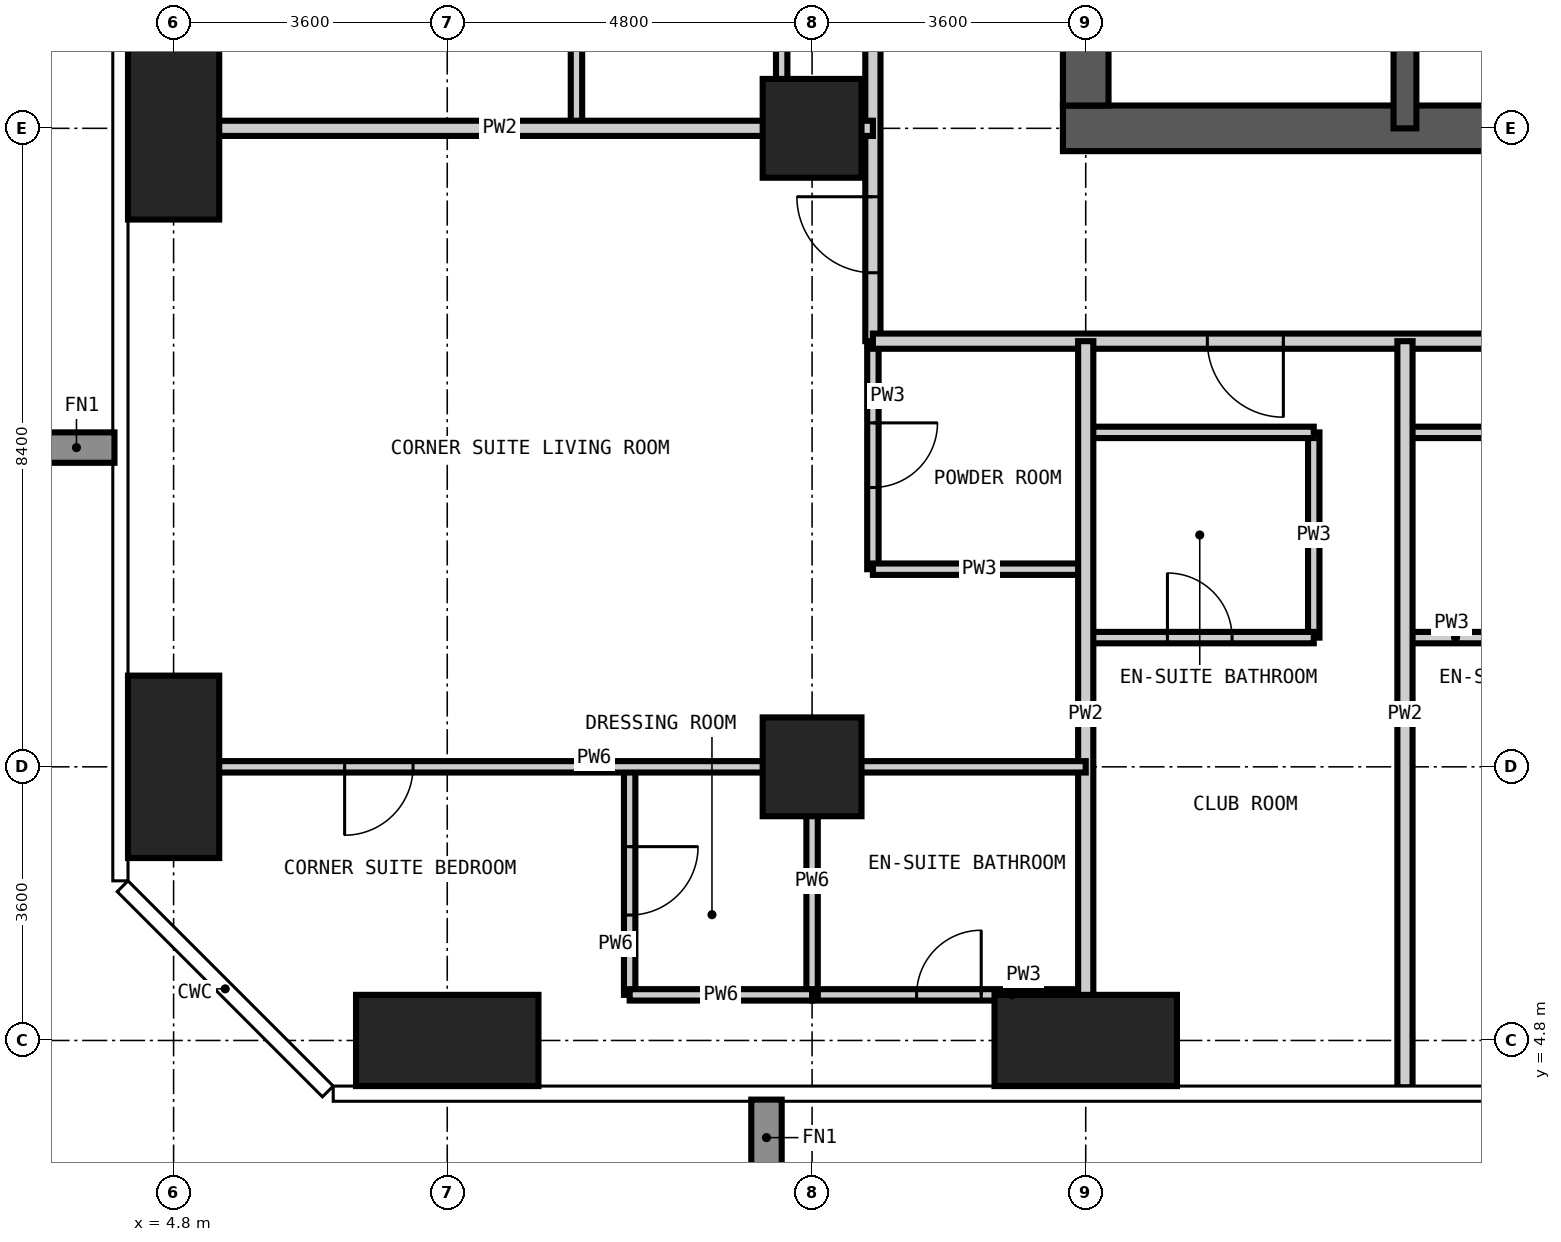
"""IFC4 building model, lengths in metres.
Left out: names, types, materials, properties, quantities, classifications, styles, units other than length and angle.
Written with IfcOpenShell. Run it as: python <this file> out.ifc"""

import sys

from ifc_helpers import new_model, si_unit, direction, frame, frame_2d, origin, origin_2d, place, context, subcontext, project, spatial, rectangle, extrude, element, fill, save


model = new_model("IFC4")
c1 = context("Model", 3, precision=1e-05, world=origin(), true_north=direction((0.0, 1.0)))
c2 = subcontext(c1, "Body", "Model", "MODEL_VIEW")
j1 = project(units=[si_unit("LENGTHUNIT", "METRE"), si_unit("PLANEANGLEUNIT", "RADIAN")], contexts=[c1])
p1 = place(None, origin())
s1 = spatial("IfcSite", under=j1, at=p1, CompositionType="ELEMENT")
p2 = place(p1, origin())
s2 = spatial("IfcBuilding", under=s1, at=p2, CompositionType="ELEMENT")
p3 = place(p2, frame((0.0, 0.0, 187.8)))
s3 = spatial("IfcBuildingStorey", under=s2, at=p3, CompositionType="ELEMENT", Elevation=187.8)
for number, where, z_axis, x_axis in (
    (1, (4.8, 8.4, -0.35), (0.0, 0.0, 1.0), (1.0, 0.0, 0.0)),
    (2, (4.8, 16.8, -0.35), (0.0, 0.0, 1.0), (1.0, 0.0, 0.0)),
):
    element("IfcColumn", number, at=place(p3, frame(where, z_axis=z_axis, x_axis=x_axis)), inside=s3, PredefinedType="COLUMN", context=c2, shape_type="SweptSolid", body=[
        extrude(rectangle(XDim=1.2, YDim=2.4, at=origin_2d()), origin(), (0.0, 0.0, 1.0), 3.6),
    ])
p4 = place(p3, frame((8.4, 4.8, -0.35), z_axis=(0.0, 0.0, 1.0), x_axis=(1.0, 0.0, 0.0)))
e3 = element("IfcColumn", 3, at=p4, inside=s3, PredefinedType="COLUMN", context=c2, shape_type="SweptSolid", body=[
    extrude(rectangle(XDim=2.4, YDim=1.2, at=origin_2d()), origin(), (0.0, 0.0, 1.0), 3.6),
])
for number, where, z_axis, x_axis in (
    (4, (13.2, 8.4, -0.35), (0.0, 0.0, 1.0), (1.0, 0.0, 0.0)),
    (5, (13.2, 16.8, -0.35), (0.0, 0.0, 1.0), (1.0, 0.0, 0.0)),
):
    element("IfcColumn", number, at=place(p3, frame(where, z_axis=z_axis, x_axis=x_axis)), inside=s3, PredefinedType="COLUMN", context=c2, shape_type="SweptSolid", body=[
        extrude(rectangle(XDim=1.3, YDim=1.3, at=origin_2d()), origin(), (0.0, 0.0, 1.0), 3.6),
    ])
p5 = place(p3, frame((16.8, 4.8, -0.35), z_axis=(0.0, 0.0, 1.0), x_axis=(1.0, 0.0, 0.0)))
e6 = element("IfcColumn", 6, at=p5, inside=s3, PredefinedType="COLUMN", context=c2, shape_type="SweptSolid", body=[
    extrude(rectangle(XDim=2.4, YDim=1.2, at=origin_2d()), origin(), (0.0, 0.0, 1.0), 3.6),
])
p6 = place(p3, frame((16.5, 16.8, -0.35), z_axis=(0.0, 0.0, 1.0), x_axis=(1.0, 0.0, 0.0)))
e7 = element("IfcWall", 7, at=p6, inside=s3, PredefinedType="SHEAR", context=c2, shape_type="SweptSolid", body=[
    extrude(rectangle(XDim=25.8, YDim=0.6, at=frame_2d((12.9, 0.0))), origin(), (0.0, 0.0, 1.0), 3.6),
])
p7 = place(p6, frame((12.4, 0.0, 0.35)))
e8 = element("IfcOpeningElement", 8, at=p7, cuts=e7, PredefinedType="OPENING", context=c2, shape_type="SweptSolid", body=[
    extrude(rectangle(XDim=1.0, YDim=2.1, at=frame_2d((0.5, 1.05))), frame((0.0, 0.31, 0.0), z_axis=(0.0, -1.0, 0.0), x_axis=(1.0, 0.0, 0.0)), (0.0, 0.0, 1.0), 0.62),
])
p8 = place(p6, frame((18.7, 0.0, 0.35)))
e9 = element("IfcOpeningElement", 9, at=p8, cuts=e7, PredefinedType="OPENING", context=c2, shape_type="SweptSolid", body=[
    extrude(rectangle(XDim=1.0, YDim=2.1, at=frame_2d((0.5, 1.05))), frame((0.0, 0.31, 0.0), z_axis=(0.0, -1.0, 0.0), x_axis=(1.0, 0.0, 0.0)), (0.0, 0.0, 1.0), 0.62),
])
p9 = place(p3, frame((16.8, 41.7, -0.35), z_axis=(0.0, 0.0, 1.0), x_axis=(0.0, -1.0, 0.0)))
e10 = element("IfcWall", 10, at=p9, inside=s3, PredefinedType="SHEAR", context=c2, shape_type="SweptSolid", body=[
    extrude(rectangle(XDim=24.6, YDim=0.6, at=frame_2d((12.3, 0.0))), origin(), (0.0, 0.0, 1.0), 3.6),
])
p10 = place(p9, frame((11.4, 0.0, 0.35)))
e11 = element("IfcOpeningElement", 11, at=p10, cuts=e10, PredefinedType="OPENING", context=c2, shape_type="SweptSolid", body=[
    extrude(rectangle(XDim=1.8, YDim=2.2, at=frame_2d((0.9, 1.1))), frame((0.0, 0.31, 0.0), z_axis=(0.0, -1.0, 0.0), x_axis=(1.0, 0.0, 0.0)), (0.0, 0.0, 1.0), 0.62),
])
p11 = place(p9, frame((20.2, 0.0, 0.35)))
e12 = element("IfcOpeningElement", 12, at=p11, cuts=e10, PredefinedType="OPENING", context=c2, shape_type="SweptSolid", body=[
    extrude(rectangle(XDim=1.0, YDim=2.1, at=frame_2d((0.5, 1.05))), frame((0.0, 0.31, 0.0), z_axis=(0.0, -1.0, 0.0), x_axis=(1.0, 0.0, 0.0)), (0.0, 0.0, 1.0), 0.62),
])
p12 = place(p9, frame((5.5, 0.0, 0.35)))
e13 = element("IfcOpeningElement", 13, at=p12, cuts=e10, PredefinedType="OPENING", context=c2, shape_type="SweptSolid", body=[
    extrude(rectangle(XDim=1.0, YDim=2.1, at=frame_2d((0.5, 1.05))), frame((0.0, 0.31, 0.0), z_axis=(0.0, -1.0, 0.0), x_axis=(1.0, 0.0, 0.0)), (0.0, 0.0, 1.0), 0.62),
])
p13 = place(p3, frame((21.0, 16.8, -0.35), z_axis=(0.0, 0.0, 1.0), x_axis=(0.0, 1.0, 0.0)))
e14 = element("IfcWall", 14, at=p13, inside=s3, PredefinedType="SHEAR", context=c2, shape_type="SweptSolid", body=[
    extrude(rectangle(XDim=2.8, YDim=0.3, at=frame_2d((1.4, 0.0))), origin(), (0.0, 0.0, 1.0), 3.6),
])
p14 = place(p3, frame((10.1, 16.8, 0.0), z_axis=(0.0, 0.0, 1.0), x_axis=(0.0, 1.0, 0.0)))
e15 = element("IfcWall", 15, at=p14, inside=s3, PredefinedType="PARTITIONING", context=c2, shape_type="SweptSolid", body=[
    extrude(rectangle(XDim=3.0, YDim=0.15, at=frame_2d((1.5, 0.0))), origin(), (0.0, 0.0, 1.0), 3.25),
])
p15 = place(p3, frame((12.8, 16.8, 0.0), z_axis=(0.0, 0.0, 1.0), x_axis=(0.0, 1.0, 0.0)))
e16 = element("IfcWall", 16, at=p15, inside=s3, PredefinedType="PARTITIONING", context=c2, shape_type="SweptSolid", body=[
    extrude(rectangle(XDim=3.0, YDim=0.15, at=frame_2d((1.5, 0.0))), origin(), (0.0, 0.0, 1.0), 3.25),
])
p16 = place(p15, frame((1.075, 0.0, 0.0)))
e17 = element("IfcOpeningElement", 17, at=p16, cuts=e16, PredefinedType="OPENING", context=c2, shape_type="SweptSolid", body=[
    extrude(rectangle(XDim=0.85, YDim=2.1, at=frame_2d((0.425, 1.05))), frame((0.0, 0.085, 0.0), z_axis=(0.0, -1.0, 0.0), x_axis=(1.0, 0.0, 0.0)), (0.0, 0.0, 1.0), 0.17),
])
p17 = place(p3, frame((14.0, 11.0, 0.0), z_axis=(0.0, 0.0, 1.0), x_axis=(0.0, 1.0, 0.0)))
e18 = element("IfcWall", 18, at=p17, inside=s3, PredefinedType="PARTITIONING", context=c2, shape_type="SweptSolid", body=[
    extrude(rectangle(XDim=3.0, YDim=0.15, at=frame_2d((1.5, 0.0))), origin(), (0.0, 0.0, 1.0), 3.25),
])
p18 = place(p17, frame((1.075, 0.0, 0.0)))
e19 = element("IfcOpeningElement", 19, at=p18, cuts=e18, PredefinedType="OPENING", context=c2, shape_type="SweptSolid", body=[
    extrude(rectangle(XDim=0.85, YDim=2.1, at=frame_2d((0.425, 1.05))), frame((0.0, 0.085, 0.0), z_axis=(0.0, -1.0, 0.0), x_axis=(1.0, 0.0, 0.0)), (0.0, 0.0, 1.0), 0.17),
])
p19 = place(p3, frame((19.8, 10.1, 0.0), z_axis=(0.0, 0.0, 1.0), x_axis=(0.0, 1.0, 0.0)))
e20 = element("IfcWall", 20, at=p19, inside=s3, PredefinedType="PARTITIONING", context=c2, shape_type="SweptSolid", body=[
    extrude(rectangle(XDim=2.7, YDim=0.15, at=frame_2d((1.35, 0.0))), origin(), (0.0, 0.0, 1.0), 3.25),
])
p20 = place(p3, frame((13.2, 5.4, 0.0), z_axis=(0.0, 0.0, 1.0), x_axis=(1.0, 0.0, 0.0)))
e21 = element("IfcWall", 21, at=p20, inside=s3, PredefinedType="PARTITIONING", context=c2, shape_type="SweptSolid", body=[
    extrude(rectangle(XDim=3.6, YDim=0.15, at=frame_2d((1.8, 0.0))), origin(), (0.0, 0.0, 1.0), 3.25),
])
p21 = place(p20, frame((1.375, 0.0, 0.0)))
e22 = element("IfcOpeningElement", 22, at=p21, cuts=e21, PredefinedType="OPENING", context=c2, shape_type="SweptSolid", body=[
    extrude(rectangle(XDim=0.85, YDim=2.1, at=frame_2d((0.425, 1.05))), frame((0.0, 0.085, 0.0), z_axis=(0.0, -1.0, 0.0), x_axis=(1.0, 0.0, 0.0)), (0.0, 0.0, 1.0), 0.17),
])
p22 = place(p3, frame((16.8, 10.1, 0.0), z_axis=(0.0, 0.0, 1.0), x_axis=(1.0, 0.0, 0.0)))
e23 = element("IfcWall", 23, at=p22, inside=s3, PredefinedType="PARTITIONING", context=c2, shape_type="SweptSolid", body=[
    extrude(rectangle(XDim=3.0, YDim=0.15, at=frame_2d((1.5, 0.0))), origin(), (0.0, 0.0, 1.0), 3.25),
])
p23 = place(p22, frame((1.075, 0.0, 0.0)))
e24 = element("IfcOpeningElement", 24, at=p23, cuts=e23, PredefinedType="OPENING", context=c2, shape_type="SweptSolid", body=[
    extrude(rectangle(XDim=0.85, YDim=2.1, at=frame_2d((0.425, 1.05))), frame((0.0, 0.085, 0.0), z_axis=(0.0, -1.0, 0.0), x_axis=(1.0, 0.0, 0.0)), (0.0, 0.0, 1.0), 0.17),
])
p24 = place(p3, frame((21.0, 10.1, 0.0), z_axis=(0.0, 0.0, 1.0), x_axis=(1.0, 0.0, 0.0)))
e25 = element("IfcWall", 25, at=p24, inside=s3, PredefinedType="PARTITIONING", context=c2, shape_type="SweptSolid", body=[
    extrude(rectangle(XDim=3.0, YDim=0.15, at=frame_2d((1.5, 0.0))), origin(), (0.0, 0.0, 1.0), 3.25),
])
p25 = place(p24, frame((1.075, 0.0, 0.0)))
e26 = element("IfcOpeningElement", 26, at=p25, cuts=e25, PredefinedType="OPENING", context=c2, shape_type="SweptSolid", body=[
    extrude(rectangle(XDim=0.85, YDim=2.1, at=frame_2d((0.425, 1.05))), frame((0.0, 0.085, 0.0), z_axis=(0.0, -1.0, 0.0), x_axis=(1.0, 0.0, 0.0)), (0.0, 0.0, 1.0), 0.17),
])
p26 = place(p3, frame((14.0, 11.0, 0.0), z_axis=(0.0, 0.0, 1.0), x_axis=(1.0, 0.0, 0.0)))
e27 = element("IfcWall", 27, at=p26, inside=s3, PredefinedType="PARTITIONING", context=c2, shape_type="SweptSolid", body=[
    extrude(rectangle(XDim=2.8, YDim=0.15, at=frame_2d((1.4, 0.0))), origin(), (0.0, 0.0, 1.0), 3.25),
])
for number, where, z_axis, x_axis in (
    (28, (16.8, 12.8, 0.0), (0.0, 0.0, 1.0), (1.0, 0.0, 0.0)),
    (29, (21.0, 12.8, 0.0), (0.0, 0.0, 1.0), (1.0, 0.0, 0.0)),
):
    element("IfcWall", number, at=place(p3, frame(where, z_axis=z_axis, x_axis=x_axis)), inside=s3, PredefinedType="PARTITIONING", context=c2, shape_type="SweptSolid", body=[
        extrude(rectangle(XDim=3.0, YDim=0.15, at=frame_2d((1.5, 0.0))), origin(), (0.0, 0.0, 1.0), 3.25),
    ])
p27 = place(p3, frame((14.0, 14.0, 0.0), z_axis=(0.0, 0.0, 1.0), x_axis=(0.0, 1.0, 0.0)))
e30 = element("IfcWall", 30, at=p27, inside=s3, PredefinedType="PARTITIONING", context=c2, shape_type="SweptSolid", body=[
    extrude(rectangle(XDim=30.2, YDim=0.2, at=frame_2d((15.1, 0.0))), origin(), (0.0, 0.0, 1.0), 3.25),
])
p28 = place(p27, frame((6.5, 0.0, 0.0)))
e31 = element("IfcOpeningElement", 31, at=p28, cuts=e30, PredefinedType="OPENING", context=c2, shape_type="SweptSolid", body=[
    extrude(rectangle(XDim=1.0, YDim=2.2, at=frame_2d((0.5, 1.1))), frame((0.0, 0.11, 0.0), z_axis=(0.0, -1.0, 0.0), x_axis=(1.0, 0.0, 0.0)), (0.0, 0.0, 1.0), 0.22),
])
p29 = place(p27, frame((14.9, 0.0, 0.0)))
e32 = element("IfcOpeningElement", 32, at=p29, cuts=e30, PredefinedType="OPENING", context=c2, shape_type="SweptSolid", body=[
    extrude(rectangle(XDim=1.0, YDim=2.2, at=frame_2d((0.5, 1.1))), frame((0.0, 0.11, 0.0), z_axis=(0.0, -1.0, 0.0), x_axis=(1.0, 0.0, 0.0)), (0.0, 0.0, 1.0), 0.22),
])
p30 = place(p27, frame((23.3, 0.0, 0.0)))
e33 = element("IfcOpeningElement", 33, at=p30, cuts=e30, PredefinedType="OPENING", context=c2, shape_type="SweptSolid", body=[
    extrude(rectangle(XDim=1.0, YDim=2.2, at=frame_2d((0.5, 1.1))), frame((0.0, 0.11, 0.0), z_axis=(0.0, -1.0, 0.0), x_axis=(1.0, 0.0, 0.0)), (0.0, 0.0, 1.0), 0.22),
])
p31 = place(p27, frame((0.9, 0.0, 0.0)))
e34 = element("IfcOpeningElement", 34, at=p31, cuts=e30, PredefinedType="OPENING", context=c2, shape_type="SweptSolid", body=[
    extrude(rectangle(XDim=1.0, YDim=2.2, at=frame_2d((0.5, 1.1))), frame((0.0, 0.11, 0.0), z_axis=(0.0, -1.0, 0.0), x_axis=(1.0, 0.0, 0.0)), (0.0, 0.0, 1.0), 0.22),
])
p32 = place(p27, frame((28.7, 0.0, 0.0)))
e35 = element("IfcOpeningElement", 35, at=p32, cuts=e30, PredefinedType="OPENING", context=c2, shape_type="SweptSolid", body=[
    extrude(rectangle(XDim=1.0, YDim=2.2, at=frame_2d((0.5, 1.1))), frame((0.0, 0.11, 0.0), z_axis=(0.0, -1.0, 0.0), x_axis=(1.0, 0.0, 0.0)), (0.0, 0.0, 1.0), 0.22),
])
p33 = place(p3, frame((45.4, 14.0, 0.0), z_axis=(0.0, 0.0, 1.0), x_axis=(-1.0, 0.0, 0.0)))
e36 = element("IfcWall", 36, at=p33, inside=s3, PredefinedType="PARTITIONING", context=c2, shape_type="SweptSolid", body=[
    extrude(rectangle(XDim=31.4, YDim=0.2, at=frame_2d((15.7, 0.0))), origin(), (0.0, 0.0, 1.0), 3.25),
])
p34 = place(p33, frame((26.0, 0.0, 0.0)))
e37 = element("IfcOpeningElement", 37, at=p34, cuts=e36, PredefinedType="OPENING", context=c2, shape_type="SweptSolid", body=[
    extrude(rectangle(XDim=1.0, YDim=2.2, at=frame_2d((0.5, 1.1))), frame((0.0, 0.11, 0.0), z_axis=(0.0, -1.0, 0.0), x_axis=(1.0, 0.0, 0.0)), (0.0, 0.0, 1.0), 0.22),
])
p35 = place(p33, frame((19.7, 0.0, 0.0)))
e38 = element("IfcOpeningElement", 38, at=p35, cuts=e36, PredefinedType="OPENING", context=c2, shape_type="SweptSolid", body=[
    extrude(rectangle(XDim=1.0, YDim=2.2, at=frame_2d((0.5, 1.1))), frame((0.0, 0.11, 0.0), z_axis=(0.0, -1.0, 0.0), x_axis=(1.0, 0.0, 0.0)), (0.0, 0.0, 1.0), 0.22),
])
p36 = place(p33, frame((11.3, 0.0, 0.0)))
e39 = element("IfcOpeningElement", 39, at=p36, cuts=e36, PredefinedType="OPENING", context=c2, shape_type="SweptSolid", body=[
    extrude(rectangle(XDim=1.0, YDim=2.2, at=frame_2d((0.5, 1.1))), frame((0.0, 0.11, 0.0), z_axis=(0.0, -1.0, 0.0), x_axis=(1.0, 0.0, 0.0)), (0.0, 0.0, 1.0), 0.22),
])
p37 = place(p33, frame((5.0, 0.0, 0.0)))
e40 = element("IfcOpeningElement", 40, at=p37, cuts=e36, PredefinedType="OPENING", context=c2, shape_type="SweptSolid", body=[
    extrude(rectangle(XDim=1.0, YDim=2.2, at=frame_2d((0.5, 1.1))), frame((0.0, 0.11, 0.0), z_axis=(0.0, -1.0, 0.0), x_axis=(1.0, 0.0, 0.0)), (0.0, 0.0, 1.0), 0.22),
])
for number, where, z_axis, x_axis in (
    (41, (16.8, 4.182, 0.0), (0.0, 0.0, 1.0), (0.0, 1.0, 0.0)),
    (42, (21.0, 4.182, 0.0), (0.0, 0.0, 1.0), (0.0, 1.0, 0.0)),
    (43, (4.182, 16.8, 0.0), (0.0, 0.0, 1.0), (1.0, 0.0, 0.0)),
):
    element("IfcWall", number, at=place(p3, frame(where, z_axis=z_axis, x_axis=x_axis)), inside=s3, PredefinedType="PARTITIONING", context=c2, shape_type="SweptSolid", body=[
        extrude(rectangle(XDim=9.818, YDim=0.2, at=frame_2d((4.909, 0.0))), origin(), (0.0, 0.0, 1.0), 3.25),
    ])
p38 = place(p3, frame((10.8, 5.4, 0.0), z_axis=(0.0, 0.0, 1.0), x_axis=(0.0, 1.0, 0.0)))
e44 = element("IfcWall", 44, at=p38, inside=s3, PredefinedType="PARTITIONING", context=c2, shape_type="SweptSolid", body=[
    extrude(rectangle(XDim=3.0, YDim=0.15, at=frame_2d((1.5, 0.0))), origin(), (0.0, 0.0, 1.0), 3.25),
])
p39 = place(p38, frame((1.05, 0.0, 0.0)))
e45 = element("IfcOpeningElement", 45, at=p39, cuts=e44, PredefinedType="OPENING", context=c2, shape_type="SweptSolid", body=[
    extrude(rectangle(XDim=0.9, YDim=2.1, at=frame_2d((0.45, 1.05))), frame((0.0, 0.085, 0.0), z_axis=(0.0, -1.0, 0.0), x_axis=(1.0, 0.0, 0.0)), (0.0, 0.0, 1.0), 0.17),
])
p40 = place(p3, frame((13.2, 5.4, 0.0), z_axis=(0.0, 0.0, 1.0), x_axis=(0.0, 1.0, 0.0)))
e46 = element("IfcWall", 46, at=p40, inside=s3, PredefinedType="PARTITIONING", context=c2, shape_type="SweptSolid", body=[
    extrude(rectangle(XDim=3.0, YDim=0.15, at=frame_2d((1.5, 0.0))), origin(), (0.0, 0.0, 1.0), 3.25),
])
p41 = place(p3, frame((10.8, 5.4, 0.0), z_axis=(0.0, 0.0, 1.0), x_axis=(1.0, 0.0, 0.0)))
e47 = element("IfcWall", 47, at=p41, inside=s3, PredefinedType="PARTITIONING", context=c2, shape_type="SweptSolid", body=[
    extrude(rectangle(XDim=2.4, YDim=0.15, at=frame_2d((1.2, 0.0))), origin(), (0.0, 0.0, 1.0), 3.25),
])
p42 = place(p3, frame((4.182, 8.4, 0.0), z_axis=(0.0, 0.0, 1.0), x_axis=(1.0, 0.0, 0.0)))
e48 = element("IfcWall", 48, at=p42, inside=s3, PredefinedType="PARTITIONING", context=c2, shape_type="SweptSolid", body=[
    extrude(rectangle(XDim=12.618, YDim=0.15, at=frame_2d((6.309, 0.0))), origin(), (0.0, 0.0, 1.0), 3.25),
])
p43 = place(p42, frame((2.868, 0.0, 0.0)))
e49 = element("IfcOpeningElement", 49, at=p43, cuts=e48, PredefinedType="OPENING", context=c2, shape_type="SweptSolid", body=[
    extrude(rectangle(XDim=0.9, YDim=2.1, at=frame_2d((0.45, 1.05))), frame((0.0, 0.085, 0.0), z_axis=(0.0, -1.0, 0.0), x_axis=(1.0, 0.0, 0.0)), (0.0, 0.0, 1.0), 0.17),
])
p44 = place(p34, origin())
e50 = element("IfcDoor", 50, at=p44, inside=s3, OperationType="SINGLE_SWING_LEFT", PredefinedType="DOOR", context=c2, shape_type="SweptSolid", body=[
    extrude(rectangle(XDim=1.0, YDim=2.2, at=frame_2d((0.5, 1.1))), frame((0.0, 0.025, 0.0), z_axis=(0.0, -1.0, 0.0), x_axis=(1.0, 0.0, 0.0)), (0.0, 0.0, 1.0), 0.05),
])
fill(e37, e50)
p45 = place(p23, origin())
e51 = element("IfcDoor", 51, at=p45, inside=s3, OperationType="SINGLE_SWING_LEFT", PredefinedType="DOOR", context=c2, shape_type="SweptSolid", body=[
    extrude(rectangle(XDim=0.85, YDim=2.1, at=frame_2d((0.425, 1.05))), frame((0.0, 0.025, 0.0), z_axis=(0.0, -1.0, 0.0), x_axis=(1.0, 0.0, 0.0)), (0.0, 0.0, 1.0), 0.05),
])
fill(e24, e51)
p46 = place(p31, origin())
e52 = element("IfcDoor", 52, at=p46, inside=s3, OperationType="SINGLE_SWING_RIGHT", PredefinedType="DOOR", context=c2, shape_type="SweptSolid", body=[
    extrude(rectangle(XDim=1.0, YDim=2.2, at=frame_2d((0.5, 1.1))), frame((0.0, 0.025, 0.0), z_axis=(0.0, -1.0, 0.0), x_axis=(1.0, 0.0, 0.0)), (0.0, 0.0, 1.0), 0.05),
])
fill(e34, e52)
p47 = place(p18, frame((0.85, 0.0, 0.0), z_axis=(0.0, 0.0, 1.0), x_axis=(-1.0, 0.0, 0.0)))
e53 = element("IfcDoor", 53, at=p47, inside=s3, OperationType="SINGLE_SWING_LEFT", PredefinedType="DOOR", context=c2, shape_type="SweptSolid", body=[
    extrude(rectangle(XDim=0.85, YDim=2.1, at=frame_2d((0.425, 1.05))), frame((0.0, 0.025, 0.0), z_axis=(0.0, -1.0, 0.0), x_axis=(1.0, 0.0, 0.0)), (0.0, 0.0, 1.0), 0.05),
])
fill(e19, e53)
p48 = place(p43, frame((0.9, 0.0, 0.0), z_axis=(0.0, 0.0, 1.0), x_axis=(-1.0, 0.0, 0.0)))
e54 = element("IfcDoor", 54, at=p48, inside=s3, OperationType="SINGLE_SWING_RIGHT", PredefinedType="DOOR", context=c2, shape_type="SweptSolid", body=[
    extrude(rectangle(XDim=0.9, YDim=2.1, at=frame_2d((0.45, 1.05))), frame((0.0, 0.025, 0.0), z_axis=(0.0, -1.0, 0.0), x_axis=(1.0, 0.0, 0.0)), (0.0, 0.0, 1.0), 0.05),
])
fill(e49, e54)
p49 = place(p21, origin())
e55 = element("IfcDoor", 55, at=p49, inside=s3, OperationType="SINGLE_SWING_RIGHT", PredefinedType="DOOR", context=c2, shape_type="SweptSolid", body=[
    extrude(rectangle(XDim=0.85, YDim=2.1, at=frame_2d((0.425, 1.05))), frame((0.0, 0.025, 0.0), z_axis=(0.0, -1.0, 0.0), x_axis=(1.0, 0.0, 0.0)), (0.0, 0.0, 1.0), 0.05),
])
fill(e22, e55)
p50 = place(p39, frame((0.9, 0.0, 0.0), z_axis=(0.0, 0.0, 1.0), x_axis=(-1.0, 0.0, 0.0)))
e56 = element("IfcDoor", 56, at=p50, inside=s3, OperationType="SINGLE_SWING_LEFT", PredefinedType="DOOR", context=c2, shape_type="SweptSolid", body=[
    extrude(rectangle(XDim=0.9, YDim=2.1, at=frame_2d((0.45, 1.05))), frame((0.0, 0.025, 0.0), z_axis=(0.0, -1.0, 0.0), x_axis=(1.0, 0.0, 0.0)), (0.0, 0.0, 1.0), 0.05),
])
fill(e45, e56)
save(model, sys.argv[1])
